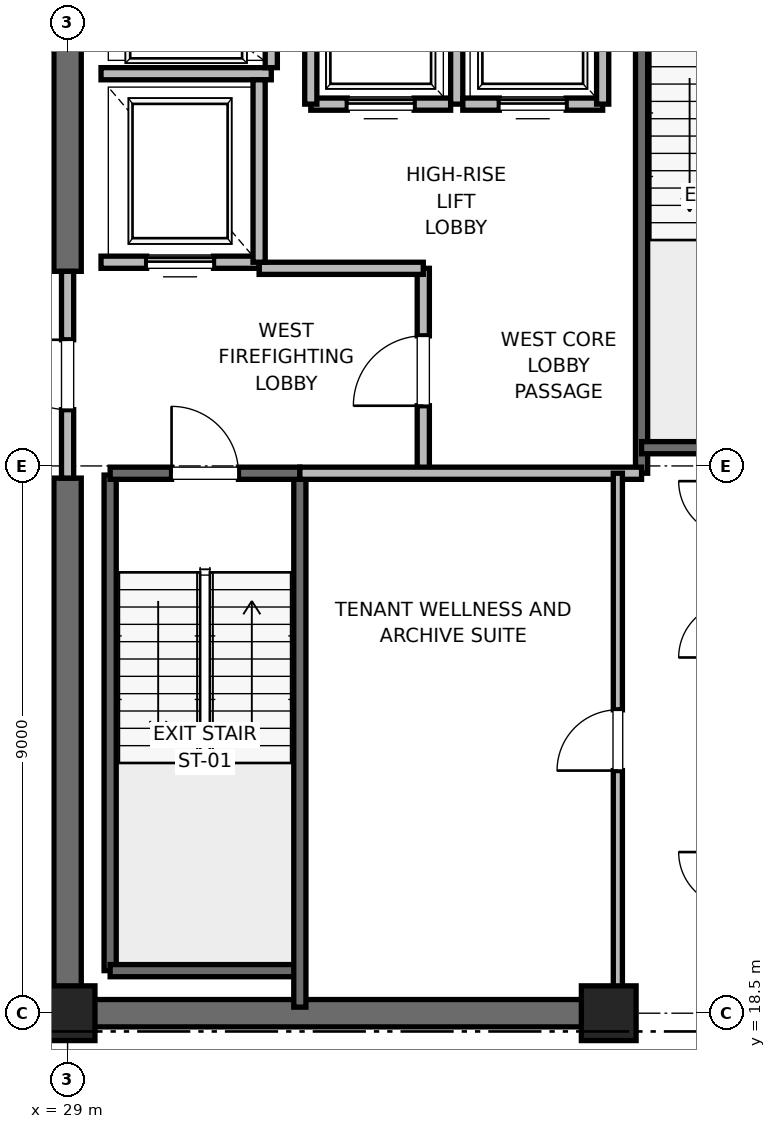
"""IFC4 building model, lengths in metres.
Left out: names, types, materials, properties, quantities, classifications, styles, units other than length and angle.
Written with IfcOpenShell. Run it as: python <this file> out.ifc"""

import sys

from ifc_helpers import new_model, si_unit, direction, frame, frame_2d, origin, origin_2d, place, context, subcontext, project, spatial, rectangle, extrude, element, fill, save


model = new_model("IFC4")
c1 = context("Model", 3, precision=1e-05, world=origin(), true_north=direction((0.0, 1.0)))
c2 = subcontext(c1, "Body", "Model", "MODEL_VIEW")
j1 = project(units=[si_unit("LENGTHUNIT", "METRE"), si_unit("PLANEANGLEUNIT", "RADIAN")], contexts=[c1])
p1 = place(None, origin())
s1 = spatial("IfcSite", under=j1, at=p1, CompositionType="ELEMENT")
p2 = place(p1, origin())
s2 = spatial("IfcBuilding", under=s1, at=p2, CompositionType="ELEMENT")
p3 = place(p2, frame((0.0, 0.0, 263.2)))
s3 = spatial("IfcBuildingStorey", under=s2, at=p3, CompositionType="ELEMENT", Elevation=263.2)
for number, where, z_axis, x_axis in (
    (1, (29.0, 18.5, 0.0), (0.0, 0.0, 1.0), (1.0, 0.0, 0.0)),
    (2, (37.9, 18.5, 0.0), (0.0, 0.0, 1.0), (1.0, 0.0, 0.0)),
):
    element("IfcColumn", number, at=place(p3, frame(where, z_axis=z_axis, x_axis=x_axis)), inside=s3, PredefinedType="PILASTER", context=c2, shape_type="SweptSolid", body=[
        extrude(rectangle(XDim=0.9, YDim=0.9, at=origin_2d()), origin(), (0.0, 0.0, 1.0), 4.0),
    ])
p4 = place(p3, frame((29.0, 18.5, 0.0), z_axis=(0.0, 0.0, 1.0), x_axis=(1.0, 0.0, 0.0)))
e3 = element("IfcWall", 3, at=p4, inside=s3, PredefinedType="SHEAR", context=c2, shape_type="SweptSolid", body=[
    extrude(rectangle(XDim=9.2, YDim=0.45, at=frame_2d((4.6, 0.0))), origin(), (0.0, 0.0, 1.0), 3.785),
])
p5 = place(p3, frame((29.0, 18.5, 0.0), z_axis=(0.0, 0.0, 1.0), x_axis=(0.0, 1.0, 0.0)))
e4 = element("IfcWall", 4, at=p5, inside=s3, PredefinedType="SHEAR", context=c2, shape_type="SweptSolid", body=[
    extrude(rectangle(XDim=8.8, YDim=0.45, at=frame_2d((4.4, 0.0))), origin(), (0.0, 0.0, 1.0), 3.785),
])
p6 = place(p3, frame((29.0, 30.7, 0.0), z_axis=(0.0, 0.0, 1.0), x_axis=(0.0, 1.0, 0.0)))
e5 = element("IfcWall", 5, at=p6, inside=s3, PredefinedType="SHEAR", context=c2, shape_type="SweptSolid", body=[
    extrude(rectangle(XDim=5.8, YDim=0.45, at=frame_2d((2.9, 0.0))), origin(), (0.0, 0.0, 1.0), 3.785),
])
p7 = place(p3, frame((29.7, 19.2, 0.0), z_axis=(0.0, 0.0, 1.0), x_axis=(0.0, 1.0, 0.0)))
e6 = element("IfcWall", 6, at=p7, inside=s3, PredefinedType="SOLIDWALL", context=c2, shape_type="SweptSolid", body=[
    extrude(rectangle(XDim=8.15, YDim=0.2, at=frame_2d((4.075, 0.0))), origin(), (0.0, 0.0, 1.0), 3.785),
])
p8 = place(p3, frame((29.7, 19.2, 0.0), z_axis=(0.0, 0.0, 1.0), x_axis=(1.0, 0.0, 0.0)))
e7 = element("IfcWall", 7, at=p8, inside=s3, PredefinedType="SOLIDWALL", context=c2, shape_type="SweptSolid", body=[
    extrude(rectangle(XDim=3.12, YDim=0.2, at=frame_2d((1.56, 0.0))), origin(), (0.0, 0.0, 1.0), 3.785),
])
p9 = place(p3, frame((32.82, 18.6, 0.0), z_axis=(0.0, 0.0, 1.0), x_axis=(0.0, 1.0, 0.0)))
e8 = element("IfcWall", 8, at=p9, inside=s3, PredefinedType="SOLIDWALL", context=c2, shape_type="SweptSolid", body=[
    extrude(rectangle(XDim=8.78, YDim=0.2, at=frame_2d((4.39, 0.0))), origin(), (0.0, 0.0, 1.0), 3.785),
])
p10 = place(p3, frame((29.7, 27.38, 0.0), z_axis=(0.0, 0.0, 1.0), x_axis=(1.0, 0.0, 0.0)))
e9 = element("IfcWall", 9, at=p10, inside=s3, PredefinedType="SOLIDWALL", context=c2, shape_type="SweptSolid", body=[
    extrude(rectangle(XDim=3.12, YDim=0.2, at=frame_2d((1.56, 0.0))), origin(), (0.0, 0.0, 1.0), 3.785),
])
p11 = place(p10, frame((1.01, 0.0, 0.0)))
e10 = element("IfcOpeningElement", 10, at=p11, cuts=e9, PredefinedType="OPENING", context=c2, shape_type="SweptSolid", body=[
    extrude(rectangle(XDim=1.1, YDim=2.15, at=frame_2d((0.55, 1.075))), frame((0.0, 0.1, 0.0), z_axis=(0.0, -1.0, 0.0), x_axis=(1.0, 0.0, 0.0)), (0.0, 0.0, 1.0), 0.2),
])
p12 = place(p3, frame((38.44, 27.38, 0.0), z_axis=(0.0, 0.0, 1.0), x_axis=(0.0, 1.0, 0.0)))
e11 = element("IfcWall", 11, at=p12, inside=s3, PredefinedType="SOLIDWALL", context=c2, shape_type="SweptSolid", body=[
    extrude(rectangle(XDim=8.87, YDim=0.2, at=frame_2d((4.435, 0.0))), origin(), (0.0, 0.0, 1.0), 3.785),
])
p13 = place(p3, frame((38.44, 27.8, 0.0), z_axis=(0.0, 0.0, 1.0), x_axis=(1.0, 0.0, 0.0)))
e12 = element("IfcWall", 12, at=p13, inside=s3, PredefinedType="SOLIDWALL", context=c2, shape_type="SweptSolid", body=[
    extrude(rectangle(XDim=3.32, YDim=0.2, at=frame_2d((1.66, 0.0))), origin(), (0.0, 0.0, 1.0), 3.785),
])
p14 = place(p3, frame((34.85, 27.38, 0.0), z_axis=(0.0, 0.0, 1.0), x_axis=(0.0, 1.0, 0.0)))
e13 = element("IfcWall", 13, at=p14, inside=s3, PredefinedType="PARTITIONING", context=c2, shape_type="SweptSolid", body=[
    extrude(rectangle(XDim=3.37, YDim=0.2, at=frame_2d((1.685, 0.0))), origin(), (0.0, 0.0, 1.0), 3.785),
])
p15 = place(p14, frame((1.11, 0.0, 0.0)))
e14 = element("IfcOpeningElement", 14, at=p15, cuts=e13, PredefinedType="OPENING", context=c2, shape_type="SweptSolid", body=[
    extrude(rectangle(XDim=1.15, YDim=2.2, at=frame_2d((0.575, 1.1))), frame((0.0, 0.1, 0.0), z_axis=(0.0, -1.0, 0.0), x_axis=(1.0, 0.0, 0.0)), (0.0, 0.0, 1.0), 0.2),
])
p16 = place(p3, frame((29.0, 27.3, 0.0), z_axis=(0.0, 0.0, 1.0), x_axis=(0.0, 1.0, 0.0)))
e15 = element("IfcWall", 15, at=p16, inside=s3, PredefinedType="PARTITIONING", context=c2, shape_type="SweptSolid", body=[
    extrude(rectangle(XDim=3.4, YDim=0.2, at=frame_2d((1.7, 0.0))), origin(), (0.0, 0.0, 1.0), 2.865),
])
p17 = place(p16, frame((1.125, 0.0, 0.0)))
e16 = element("IfcOpeningElement", 16, at=p17, cuts=e15, PredefinedType="OPENING", context=c2, shape_type="SweptSolid", body=[
    extrude(rectangle(XDim=1.15, YDim=2.2, at=frame_2d((0.575, 1.1))), frame((0.0, 0.1, 0.0), z_axis=(0.0, -1.0, 0.0), x_axis=(1.0, 0.0, 0.0)), (0.0, 0.0, 1.0), 0.2),
])
p18 = place(p3, frame((32.82, 27.38, 0.0), z_axis=(0.0, 0.0, 1.0), x_axis=(1.0, 0.0, 0.0)))
e17 = element("IfcWall", 17, at=p18, inside=s3, PredefinedType="PARTITIONING", context=c2, shape_type="SweptSolid", body=[
    extrude(rectangle(XDim=5.62, YDim=0.2, at=frame_2d((2.81, 0.0))), origin(), (0.0, 0.0, 1.0), 3.785),
])
p19 = place(p3, frame((32.15, 30.75, 0.0), z_axis=(0.0, 0.0, 1.0), x_axis=(1.0, 0.0, 0.0)))
e18 = element("IfcWall", 18, at=p19, inside=s3, PredefinedType="PARTITIONING", context=c2, shape_type="SweptSolid", body=[
    extrude(rectangle(XDim=2.7, YDim=0.2, at=frame_2d((1.35, 0.0))), origin(), (0.0, 0.0, 1.0), 3.785),
])
p20 = place(p3, frame((29.55, 30.85, 0.0), z_axis=(0.0, 0.0, 1.0), x_axis=(1.0, 0.0, 0.0)))
e19 = element("IfcWall", 19, at=p20, inside=s3, PredefinedType="SOLIDWALL", context=c2, shape_type="SweptSolid", body=[
    extrude(rectangle(XDim=2.6, YDim=0.2, at=frame_2d((1.3, 0.0))), origin(), (0.0, 0.0, 1.0), 2.865),
])
p21 = place(p20, frame((0.75, 0.0, 0.0)))
e20 = element("IfcOpeningElement", 20, at=p21, cuts=e19, PredefinedType="OPENING", context=c2, shape_type="SweptSolid", body=[
    extrude(rectangle(XDim=1.1, YDim=2.2, at=frame_2d((0.55, 1.1))), frame((0.0, 0.1, 0.0), z_axis=(0.0, -1.0, 0.0), x_axis=(1.0, 0.0, 0.0)), (0.0, 0.0, 1.0), 0.2),
])
p22 = place(p3, frame((29.55, 33.95, 0.0), z_axis=(0.0, 0.0, 1.0), x_axis=(1.0, 0.0, 0.0)))
e21 = element("IfcWall", 21, at=p22, inside=s3, PredefinedType="SOLIDWALL", context=c2, shape_type="SweptSolid", body=[
    extrude(rectangle(XDim=2.8, YDim=0.2, at=frame_2d((1.4, 0.0))), origin(), (0.0, 0.0, 1.0), 3.785),
])
p23 = place(p3, frame((32.15, 30.85, 0.0), z_axis=(0.0, 0.0, 1.0), x_axis=(0.0, 1.0, 0.0)))
e22 = element("IfcWall", 22, at=p23, inside=s3, PredefinedType="SOLIDWALL", context=c2, shape_type="SweptSolid", body=[
    extrude(rectangle(XDim=3.0, YDim=0.2, at=frame_2d((1.5, 0.0))), origin(), (0.0, 0.0, 1.0), 3.785),
])
p24 = place(p3, frame((32.35, 34.05, 0.0), z_axis=(0.0, 0.0, 1.0), x_axis=(0.0, 1.0, 0.0)))
e23 = element("IfcWall", 23, at=p24, inside=s3, PredefinedType="SOLIDWALL", context=c2, shape_type="SweptSolid", body=[
    extrude(rectangle(XDim=2.1, YDim=0.2, at=frame_2d((1.05, 0.0))), origin(), (0.0, 0.0, 1.0), 3.785),
])
p25 = place(p24, frame((0.5, 0.0, 0.0)))
e24 = element("IfcOpeningElement", 24, at=p25, cuts=e23, PredefinedType="OPENING", context=c2, shape_type="SweptSolid", body=[
    extrude(rectangle(XDim=1.1, YDim=2.2, at=frame_2d((0.55, 1.1))), frame((0.0, 0.1, 0.0), z_axis=(0.0, -1.0, 0.0), x_axis=(1.0, 0.0, 0.0)), (0.0, 0.0, 1.0), 0.2),
])
p26 = place(p3, frame((33.0, 33.45, 0.0), z_axis=(0.0, 0.0, 1.0), x_axis=(1.0, 0.0, 0.0)))
e25 = element("IfcWall", 25, at=p26, inside=s3, PredefinedType="SOLIDWALL", context=c2, shape_type="SweptSolid", body=[
    extrude(rectangle(XDim=2.3, YDim=0.2, at=frame_2d((1.15, 0.0))), origin(), (0.0, 0.0, 1.0), 3.785),
])
p27 = place(p26, frame((0.6, 0.0, 0.0)))
e26 = element("IfcOpeningElement", 26, at=p27, cuts=e25, PredefinedType="OPENING", context=c2, shape_type="SweptSolid", body=[
    extrude(rectangle(XDim=1.1, YDim=2.2, at=frame_2d((0.55, 1.1))), frame((0.0, 0.1, 0.0), z_axis=(0.0, -1.0, 0.0), x_axis=(1.0, 0.0, 0.0)), (0.0, 0.0, 1.0), 0.2),
])
p28 = place(p3, frame((33.0, 36.05, 0.0), z_axis=(0.0, 0.0, 1.0), x_axis=(0.0, -1.0, 0.0)))
e27 = element("IfcWall", 27, at=p28, inside=s3, PredefinedType="SOLIDWALL", context=c2, shape_type="SweptSolid", body=[
    extrude(rectangle(XDim=2.6, YDim=0.2, at=frame_2d((1.3, 0.0))), origin(), (0.0, 0.0, 1.0), 3.785),
])
p29 = place(p3, frame((35.4, 33.45, 0.0), z_axis=(0.0, 0.0, 1.0), x_axis=(0.0, 1.0, 0.0)))
e28 = element("IfcWall", 28, at=p29, inside=s3, PredefinedType="SOLIDWALL", context=c2, shape_type="SweptSolid", body=[
    extrude(rectangle(XDim=2.6, YDim=0.2, at=frame_2d((1.3, 0.0))), origin(), (0.0, 0.0, 1.0), 2.865),
])
p30 = place(p3, frame((35.5, 33.45, 0.0), z_axis=(0.0, 0.0, 1.0), x_axis=(1.0, 0.0, 0.0)))
e29 = element("IfcWall", 29, at=p30, inside=s3, PredefinedType="SOLIDWALL", context=c2, shape_type="SweptSolid", body=[
    extrude(rectangle(XDim=2.3, YDim=0.2, at=frame_2d((1.15, 0.0))), origin(), (0.0, 0.0, 1.0), 3.785),
])
p31 = place(p30, frame((0.6, 0.0, 0.0)))
e30 = element("IfcOpeningElement", 30, at=p31, cuts=e29, PredefinedType="OPENING", context=c2, shape_type="SweptSolid", body=[
    extrude(rectangle(XDim=1.1, YDim=2.2, at=frame_2d((0.55, 1.1))), frame((0.0, 0.1, 0.0), z_axis=(0.0, -1.0, 0.0), x_axis=(1.0, 0.0, 0.0)), (0.0, 0.0, 1.0), 0.2),
])
p32 = place(p3, frame((37.8, 33.45, 0.0), z_axis=(0.0, 0.0, 1.0), x_axis=(0.0, 1.0, 0.0)))
e31 = element("IfcWall", 31, at=p32, inside=s3, PredefinedType="SOLIDWALL", context=c2, shape_type="SweptSolid", body=[
    extrude(rectangle(XDim=2.6, YDim=0.2, at=frame_2d((1.3, 0.0))), origin(), (0.0, 0.0, 1.0), 2.865),
])
p33 = place(p3, frame((38.05, 18.6, 0.0), z_axis=(0.0, 0.0, 1.0), x_axis=(0.0, 1.0, 0.0)))
e32 = element("IfcWall", 32, at=p33, inside=s3, PredefinedType="PARTITIONING", context=c2, shape_type="SweptSolid", body=[
    extrude(rectangle(XDim=8.78, YDim=0.15, at=frame_2d((4.39, 0.0))), origin(), (0.0, 0.0, 1.0), 2.85),
])
p34 = place(p33, frame((3.89, 0.0, 0.0)))
e33 = element("IfcOpeningElement", 33, at=p34, cuts=e32, PredefinedType="OPENING", context=c2, shape_type="SweptSolid", body=[
    extrude(rectangle(XDim=1.0, YDim=2.15, at=frame_2d((0.5, 1.075))), frame((0.0, 0.075, 0.0), z_axis=(0.0, -1.0, 0.0), x_axis=(1.0, 0.0, 0.0)), (0.0, 0.0, 1.0), 0.15),
])
p35 = place(p11, origin())
e34 = element("IfcDoor", 34, at=p35, inside=s3, OperationType="SINGLE_SWING_LEFT", PredefinedType="DOOR", context=c2, shape_type="SweptSolid", body=[
    extrude(rectangle(XDim=1.1, YDim=2.15, at=frame_2d((0.55, 1.075))), frame((0.0, 0.025, 0.0), z_axis=(0.0, -1.0, 0.0), x_axis=(1.0, 0.0, 0.0)), (0.0, 0.0, 1.0), 0.05),
])
fill(e10, e34)
p36 = place(p15, origin())
e35 = element("IfcDoor", 35, at=p36, inside=s3, OperationType="SINGLE_SWING_LEFT", PredefinedType="DOOR", context=c2, shape_type="SweptSolid", body=[
    extrude(rectangle(XDim=1.15, YDim=2.2, at=frame_2d((0.575, 1.1))), frame((0.0, 0.025, 0.0), z_axis=(0.0, -1.0, 0.0), x_axis=(1.0, 0.0, 0.0)), (0.0, 0.0, 1.0), 0.05),
])
fill(e14, e35)
p37 = place(p17, origin())
e36 = element("IfcDoor", 36, at=p37, inside=s3, OperationType="SINGLE_SWING_RIGHT", PredefinedType="DOOR", context=c2, shape_type="SweptSolid", body=[
    extrude(rectangle(XDim=1.15, YDim=2.2, at=frame_2d((0.575, 1.1))), frame((0.0, 0.025, 0.0), z_axis=(0.0, -1.0, 0.0), x_axis=(1.0, 0.0, 0.0)), (0.0, 0.0, 1.0), 0.05),
])
fill(e16, e36)
p38 = place(p21, origin())
e37 = element("IfcDoor", 37, at=p38, inside=s3, OperationType="SLIDING_TO_RIGHT", PredefinedType="DOOR", context=c2, shape_type="SweptSolid", body=[
    extrude(rectangle(XDim=1.1, YDim=2.2, at=frame_2d((0.55, 1.1))), frame((0.0, 0.025, 0.0), z_axis=(0.0, -1.0, 0.0), x_axis=(1.0, 0.0, 0.0)), (0.0, 0.0, 1.0), 0.05),
])
fill(e20, e37)
p39 = place(p27, origin())
e38 = element("IfcDoor", 38, at=p39, inside=s3, OperationType="SLIDING_TO_RIGHT", PredefinedType="DOOR", context=c2, shape_type="SweptSolid", body=[
    extrude(rectangle(XDim=1.1, YDim=2.2, at=frame_2d((0.55, 1.1))), frame((0.0, 0.025, 0.0), z_axis=(0.0, -1.0, 0.0), x_axis=(1.0, 0.0, 0.0)), (0.0, 0.0, 1.0), 0.05),
])
fill(e26, e38)
p40 = place(p31, origin())
e39 = element("IfcDoor", 39, at=p40, inside=s3, OperationType="SLIDING_TO_RIGHT", PredefinedType="DOOR", context=c2, shape_type="SweptSolid", body=[
    extrude(rectangle(XDim=1.1, YDim=2.2, at=frame_2d((0.55, 1.1))), frame((0.0, 0.025, 0.0), z_axis=(0.0, -1.0, 0.0), x_axis=(1.0, 0.0, 0.0)), (0.0, 0.0, 1.0), 0.05),
])
fill(e30, e39)
p41 = place(p34, origin())
e40 = element("IfcDoor", 40, at=p41, inside=s3, OperationType="SINGLE_SWING_LEFT", PredefinedType="DOOR", context=c2, shape_type="SweptSolid", body=[
    extrude(rectangle(XDim=1.0, YDim=2.15, at=frame_2d((0.5, 1.075))), frame((0.0, 0.025, 0.0), z_axis=(0.0, -1.0, 0.0), x_axis=(1.0, 0.0, 0.0)), (0.0, 0.0, 1.0), 0.05),
])
fill(e33, e40)
save(model, sys.argv[1])
